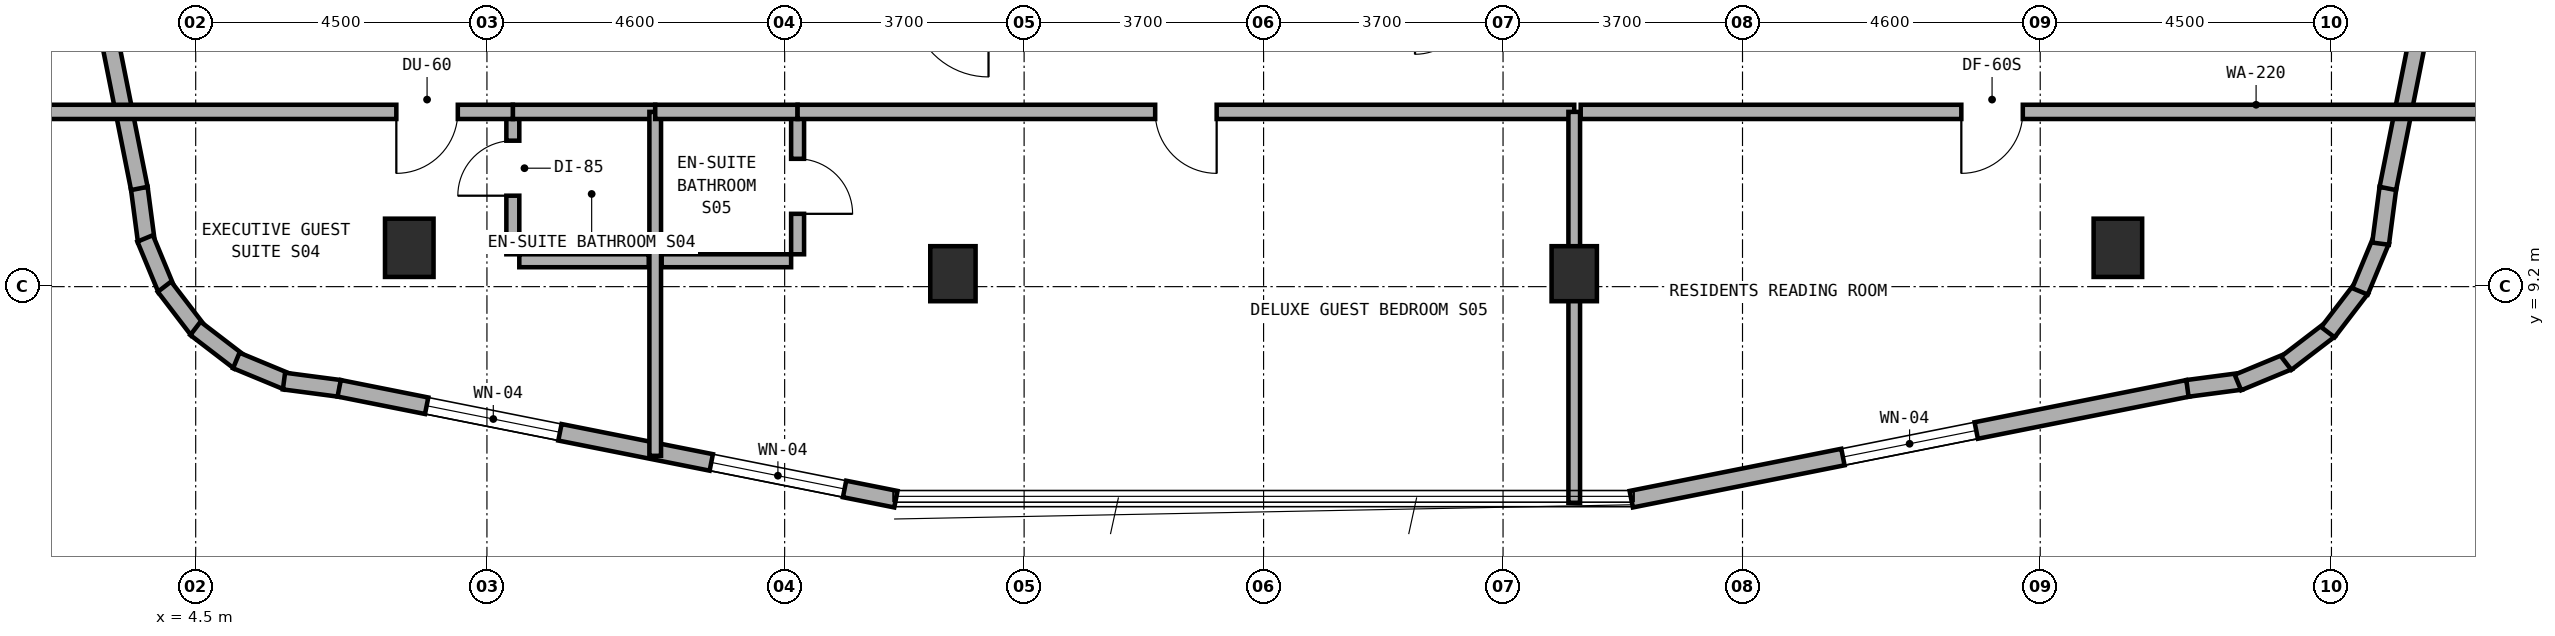
"""IFC4 building model, lengths in metres.
Left out: names, types, materials, properties, quantities, classifications, styles, units other than length and angle.
Written with IfcOpenShell. Run it as: python <this file> out.ifc"""

import sys

from ifc_helpers import new_model, si_unit, direction, frame, frame_2d, origin, origin_2d, place, context, subcontext, project, spatial, rectangle, extrude, element, fill, save


model = new_model("IFC4")
c1 = context("Model", 3, precision=1e-05, world=origin(), true_north=direction((0.0, 1.0)))
c2 = subcontext(c1, "Body", "Model", "MODEL_VIEW")
j1 = project(units=[si_unit("LENGTHUNIT", "METRE"), si_unit("PLANEANGLEUNIT", "RADIAN")], contexts=[c1])
p1 = place(None, origin())
s1 = spatial("IfcSite", under=j1, at=p1, CompositionType="ELEMENT")
p2 = place(p1, origin())
s2 = spatial("IfcBuilding", under=s1, at=p2, CompositionType="ELEMENT")
p3 = place(p2, frame((0.0, 0.0, 235.1)))
s3 = spatial("IfcBuildingStorey", under=s2, at=p3, CompositionType="ELEMENT", Elevation=235.1)
for number, where, z_axis, x_axis in (
    (1, (16.2, 9.4, 0.0), (0.0, 0.0, 1.0), (1.0, 0.0, 0.0)),
    (2, (25.8, 9.4, 0.0), (0.0, 0.0, 1.0), (1.0, 0.0, 0.0)),
):
    element("IfcColumn", number, at=place(p3, frame(where, z_axis=z_axis, x_axis=x_axis)), inside=s3, PredefinedType="COLUMN", context=c2, shape_type="SweptSolid", body=[
        extrude(rectangle(XDim=0.7, YDim=0.85, at=origin_2d()), origin(), (0.0, 0.0, 1.0), 3.6),
    ])
for number, where, z_axis, x_axis in (
    (3, (7.8, 9.8, 0.0), (0.0, 0.0, 1.0), (1.0, 0.0, 0.0)),
    (4, (34.2, 9.8, 0.0), (0.0, 0.0, 1.0), (1.0, 0.0, 0.0)),
):
    element("IfcColumn", number, at=place(p3, frame(where, z_axis=z_axis, x_axis=x_axis)), inside=s3, PredefinedType="COLUMN", context=c2, shape_type="SweptSolid", body=[
        extrude(rectangle(XDim=0.75, YDim=0.9, at=origin_2d()), origin(), (0.0, 0.0, 1.0), 3.6),
    ])
p4 = place(p3, frame((3.628, 10.725, 0.0), z_axis=(0.0, 0.0, 1.0), x_axis=(0.130954667764, -0.9913883573, 0.0)))
e5 = element("IfcWall", 5, at=p4, inside=s3, PredefinedType="STANDARD", context=c2, shape_type="SweptSolid", body=[
    extrude(rectangle(XDim=0.833, YDim=0.26, at=frame_2d((0.417, 0.0))), origin(), (0.0, 0.0, 1.0), 3.28),
])
p5 = place(p3, frame((3.719, 9.945, 0.0), z_axis=(0.0, 0.0, 1.0), x_axis=(0.382985169477, -0.923754491172, 0.0)))
e6 = element("IfcWall", 6, at=p5, inside=s3, PredefinedType="STANDARD", context=c2, shape_type="SweptSolid", body=[
    extrude(rectangle(XDim=0.851, YDim=0.26, at=frame_2d((0.426, 0.0))), origin(), (0.0, 0.0, 1.0), 3.28),
])
for number, where, z_axis, x_axis in (
    (7, (4.017, 9.199, 0.0), (0.0, 0.0, 1.0), (0.608, -0.794, 0.0)),
    (8, (4.496, 8.555, 0.0), (0.0, 0.0, 1.0), (0.794, -0.608, 0.0)),
):
    element("IfcWall", number, at=place(p3, frame(where, z_axis=z_axis, x_axis=x_axis)), inside=s3, PredefinedType="STANDARD", context=c2, shape_type="SweptSolid", body=[
        extrude(rectangle(XDim=0.85, YDim=0.26, at=frame_2d((0.425, 0.0))), origin(), (0.0, 0.0, 1.0), 3.28),
    ])
p6 = place(p3, frame((5.127, 8.059, 0.0), z_axis=(0.0, 0.0, 1.0), x_axis=(0.923652976167, -0.383229930484, 0.0)))
e9 = element("IfcWall", 9, at=p6, inside=s3, PredefinedType="STANDARD", context=c2, shape_type="SweptSolid", body=[
    extrude(rectangle(XDim=0.851, YDim=0.26, at=frame_2d((0.426, 0.0))), origin(), (0.0, 0.0, 1.0), 3.28),
])
p7 = place(p3, frame((5.864, 7.741, 0.0), z_axis=(0.0, 0.0, 1.0), x_axis=(0.991493480548, -0.130156359936, 0.0)))
e10 = element("IfcWall", 10, at=p7, inside=s3, PredefinedType="STANDARD", context=c2, shape_type="SweptSolid", body=[
    extrude(rectangle(XDim=0.868, YDim=0.26, at=frame_2d((0.434, 0.0))), origin(), (0.0, 0.0, 1.0), 3.28),
])
p8 = place(p3, frame((6.717, 7.629, 0.0), z_axis=(0.0, 0.0, 1.0), x_axis=(0.980745199176, -0.195291715883, 0.0)))
e11 = element("IfcWall", 11, at=p8, inside=s3, PredefinedType="STANDARD", context=c2, shape_type="SweptSolid", body=[
    extrude(rectangle(XDim=8.771, YDim=0.26, at=frame_2d((4.385, 0.0))), origin(), (0.0, 0.0, 1.0), 3.28),
])
p9 = place(p8, frame((1.378, 0.0, 0.85)))
e12 = element("IfcOpeningElement", 12, at=p9, cuts=e11, PredefinedType="OPENING", context=c2, shape_type="SweptSolid", body=[
    extrude(rectangle(XDim=2.1, YDim=1.5, at=frame_2d((1.05, 0.75))), frame((0.0, 0.14, 0.0), z_axis=(0.0, -1.0, 0.0), x_axis=(1.0, 0.0, 0.0)), (0.0, 0.0, 1.0), 0.28),
])
p10 = place(p8, frame((5.862, 0.0, 0.85)))
e13 = element("IfcOpeningElement", 13, at=p10, cuts=e11, PredefinedType="OPENING", context=c2, shape_type="SweptSolid", body=[
    extrude(rectangle(XDim=2.1, YDim=1.5, at=frame_2d((1.05, 0.75))), frame((0.0, 0.14, 0.0), z_axis=(0.0, -1.0, 0.0), x_axis=(1.0, 0.0, 0.0)), (0.0, 0.0, 1.0), 0.28),
])
p11 = place(p3, frame((26.681, 5.916, 0.0), z_axis=(0.0, 0.0, 1.0), x_axis=(0.980745199176, 0.195291715883, 0.0)))
e14 = element("IfcWall", 14, at=p11, inside=s3, PredefinedType="STANDARD", context=c2, shape_type="SweptSolid", body=[
    extrude(rectangle(XDim=8.771, YDim=0.26, at=frame_2d((4.385, 0.0))), origin(), (0.0, 0.0, 1.0), 3.28),
])
p12 = place(p11, frame((3.335, 0.0, 0.85)))
e15 = element("IfcOpeningElement", 15, at=p12, cuts=e14, PredefinedType="OPENING", context=c2, shape_type="SweptSolid", body=[
    extrude(rectangle(XDim=2.1, YDim=1.5, at=frame_2d((1.05, 0.75))), frame((0.0, 0.14, 0.0), z_axis=(0.0, -1.0, 0.0), x_axis=(1.0, 0.0, 0.0)), (0.0, 0.0, 1.0), 0.28),
])
p13 = place(p3, frame((35.275, 7.628, 0.0), z_axis=(0.0, 0.0, 1.0), x_axis=(0.9913883573, 0.130954667764, 0.0)))
e16 = element("IfcWall", 16, at=p13, inside=s3, PredefinedType="STANDARD", context=c2, shape_type="SweptSolid", body=[
    extrude(rectangle(XDim=0.833, YDim=0.26, at=frame_2d((0.417, 0.0))), origin(), (0.0, 0.0, 1.0), 3.28),
])
p14 = place(p3, frame((36.055, 7.719, 0.0), z_axis=(0.0, 0.0, 1.0), x_axis=(0.923754491172, 0.382985169477, 0.0)))
e17 = element("IfcWall", 17, at=p14, inside=s3, PredefinedType="STANDARD", context=c2, shape_type="SweptSolid", body=[
    extrude(rectangle(XDim=0.851, YDim=0.26, at=frame_2d((0.426, 0.0))), origin(), (0.0, 0.0, 1.0), 3.28),
])
for number, where, z_axis, x_axis in (
    (18, (36.801, 8.017, 0.0), (0.0, 0.0, 1.0), (0.794, 0.608, 0.0)),
    (19, (37.445, 8.496, 0.0), (0.0, 0.0, 1.0), (0.608, 0.794, 0.0)),
):
    element("IfcWall", number, at=place(p3, frame(where, z_axis=z_axis, x_axis=x_axis)), inside=s3, PredefinedType="STANDARD", context=c2, shape_type="SweptSolid", body=[
        extrude(rectangle(XDim=0.85, YDim=0.26, at=frame_2d((0.425, 0.0))), origin(), (0.0, 0.0, 1.0), 3.28),
    ])
p15 = place(p3, frame((37.941, 9.127, 0.0), z_axis=(0.0, 0.0, 1.0), x_axis=(0.383229930484, 0.923652976167, 0.0)))
e20 = element("IfcWall", 20, at=p15, inside=s3, PredefinedType="STANDARD", context=c2, shape_type="SweptSolid", body=[
    extrude(rectangle(XDim=0.851, YDim=0.26, at=frame_2d((0.426, 0.0))), origin(), (0.0, 0.0, 1.0), 3.28),
])
p16 = place(p3, frame((38.259, 9.864, 0.0), z_axis=(0.0, 0.0, 1.0), x_axis=(0.130156359936, 0.991493480548, 0.0)))
e21 = element("IfcWall", 21, at=p16, inside=s3, PredefinedType="STANDARD", context=c2, shape_type="SweptSolid", body=[
    extrude(rectangle(XDim=0.868, YDim=0.26, at=frame_2d((0.434, 0.0))), origin(), (0.0, 0.0, 1.0), 3.28),
])
p17 = place(p3, frame((38.371, 10.717, 0.0), z_axis=(0.0, 0.0, 1.0), x_axis=(0.195291715883, 0.980745199176, 0.0)))
e22 = element("IfcWall", 22, at=p17, inside=s3, PredefinedType="STANDARD", context=c2, shape_type="SweptSolid", body=[
    extrude(rectangle(XDim=8.771, YDim=0.26, at=frame_2d((4.385, 0.0))), origin(), (0.0, 0.0, 1.0), 3.28),
])
p18 = place(p17, frame((4.0, 0.0, 0.85)))
e23 = element("IfcOpeningElement", 23, at=p18, cuts=e22, PredefinedType="OPENING", context=c2, shape_type="SweptSolid", body=[
    extrude(rectangle(XDim=2.1, YDim=1.5, at=frame_2d((1.05, 0.75))), frame((0.0, 0.14, 0.0), z_axis=(0.0, -1.0, 0.0), x_axis=(1.0, 0.0, 0.0)), (0.0, 0.0, 1.0), 0.28),
])
p19 = place(p3, frame((1.916, 19.319, 0.0), z_axis=(0.0, 0.0, 1.0), x_axis=(0.195291715883, -0.980745199176, 0.0)))
e24 = element("IfcWall", 24, at=p19, inside=s3, PredefinedType="STANDARD", context=c2, shape_type="SweptSolid", body=[
    extrude(rectangle(XDim=8.771, YDim=0.26, at=frame_2d((4.385, 0.0))), origin(), (0.0, 0.0, 1.0), 3.28),
])
p20 = place(p19, frame((2.67, 0.0, 0.85)))
e25 = element("IfcOpeningElement", 25, at=p20, cuts=e24, PredefinedType="OPENING", context=c2, shape_type="SweptSolid", body=[
    extrude(rectangle(XDim=2.1, YDim=1.5, at=frame_2d((1.05, 0.75))), frame((0.0, 0.14, 0.0), z_axis=(0.0, -1.0, 0.0), x_axis=(1.0, 0.0, 0.0)), (0.0, 0.0, 1.0), 0.28),
])
p21 = place(p3, frame((9.4, 9.7, 0.0), z_axis=(0.0, 0.0, 1.0), x_axis=(0.0, 1.0, 0.0)))
e26 = element("IfcWall", 26, at=p21, inside=s3, PredefinedType="PLUMBINGWALL", context=c2, shape_type="SweptSolid", body=[
    extrude(rectangle(XDim=2.1, YDim=0.2, at=frame_2d((1.05, 0.0))), origin(), (0.0, 0.0, 1.0), 2.895),
])
p22 = place(p21, frame((0.905, 0.0, 0.0)))
e27 = element("IfcOpeningElement", 27, at=p22, cuts=e26, PredefinedType="OPENING", context=c2, shape_type="SweptSolid", body=[
    extrude(rectangle(XDim=0.85, YDim=2.1, at=frame_2d((0.425, 1.05))), frame((0.0, 0.11, 0.0), z_axis=(0.0, -1.0, 0.0), x_axis=(1.0, 0.0, 0.0)), (0.0, 0.0, 1.0), 0.22),
])
p23 = place(p3, frame((9.5, 9.6, 0.0), z_axis=(0.0, 0.0, 1.0), x_axis=(1.0, 0.0, 0.0)))
e28 = element("IfcWall", 28, at=p23, inside=s3, PredefinedType="PLUMBINGWALL", context=c2, shape_type="SweptSolid", body=[
    extrude(rectangle(XDim=2.0, YDim=0.2, at=frame_2d((1.0, 0.0))), origin(), (0.0, 0.0, 1.0), 2.975),
])
p24 = place(p3, frame((9.4, 11.9, 0.0), z_axis=(0.0, 0.0, 1.0), x_axis=(1.0, 0.0, 0.0)))
e29 = element("IfcWall", 29, at=p24, inside=s3, PredefinedType="SOLIDWALL", context=c2, shape_type="SweptSolid", body=[
    extrude(rectangle(XDim=2.2, YDim=0.22, at=frame_2d((1.1, 0.0))), origin(), (0.0, 0.0, 1.0), 3.28),
])
p25 = place(p3, frame((1.96, 11.9, 0.0), z_axis=(0.0, 0.0, 1.0), x_axis=(1.0, 0.0, 0.0)))
e30 = element("IfcWall", 30, at=p25, inside=s3, PredefinedType="SOLIDWALL", context=c2, shape_type="SweptSolid", body=[
    extrude(rectangle(XDim=7.44, YDim=0.22, at=frame_2d((3.72, 0.0))), origin(), (0.0, 0.0, 1.0), 2.705),
])
p26 = place(p25, frame((5.64, 0.0, 0.0)))
e31 = element("IfcOpeningElement", 31, at=p26, cuts=e30, PredefinedType="OPENING", context=c2, shape_type="SweptSolid", body=[
    extrude(rectangle(XDim=0.95, YDim=2.1, at=frame_2d((0.475, 1.05))), frame((0.0, 0.12, 0.0), z_axis=(0.0, -1.0, 0.0), x_axis=(1.0, 0.0, 0.0)), (0.0, 0.0, 1.0), 0.24),
])
p27 = place(p3, frame((11.6, 6.586, 0.0), z_axis=(0.0, 0.0, 1.0), x_axis=(0.0, 1.0, 0.0)))
e32 = element("IfcWall", 32, at=p27, inside=s3, PredefinedType="SOLIDWALL", context=c2, shape_type="SweptSolid", body=[
    extrude(rectangle(XDim=5.314, YDim=0.18, at=frame_2d((2.657, 0.0))), origin(), (0.0, 0.0, 1.0), 2.895),
])
p28 = place(p3, frame((13.8, 9.7, 0.0), z_axis=(0.0, 0.0, 1.0), x_axis=(0.0, 1.0, 0.0)))
e33 = element("IfcWall", 33, at=p28, inside=s3, PredefinedType="PLUMBINGWALL", context=c2, shape_type="SweptSolid", body=[
    extrude(rectangle(XDim=2.1, YDim=0.2, at=frame_2d((1.05, 0.0))), origin(), (0.0, 0.0, 1.0), 2.895),
])
p29 = place(p28, frame((0.625, 0.0, 0.0)))
e34 = element("IfcOpeningElement", 34, at=p29, cuts=e33, PredefinedType="OPENING", context=c2, shape_type="SweptSolid", body=[
    extrude(rectangle(XDim=0.85, YDim=2.1, at=frame_2d((0.425, 1.05))), frame((0.0, 0.11, 0.0), z_axis=(0.0, -1.0, 0.0), x_axis=(1.0, 0.0, 0.0)), (0.0, 0.0, 1.0), 0.22),
])
p30 = place(p3, frame((11.7, 9.6, 0.0), z_axis=(0.0, 0.0, 1.0), x_axis=(1.0, 0.0, 0.0)))
e35 = element("IfcWall", 35, at=p30, inside=s3, PredefinedType="PLUMBINGWALL", context=c2, shape_type="SweptSolid", body=[
    extrude(rectangle(XDim=2.0, YDim=0.2, at=frame_2d((1.0, 0.0))), origin(), (0.0, 0.0, 1.0), 2.975),
])
p31 = place(p3, frame((11.6, 11.9, 0.0), z_axis=(0.0, 0.0, 1.0), x_axis=(1.0, 0.0, 0.0)))
e36 = element("IfcWall", 36, at=p31, inside=s3, PredefinedType="SOLIDWALL", context=c2, shape_type="SweptSolid", body=[
    extrude(rectangle(XDim=2.2, YDim=0.22, at=frame_2d((1.1, 0.0))), origin(), (0.0, 0.0, 1.0), 3.28),
])
p32 = place(p3, frame((13.8, 11.9, 0.0), z_axis=(0.0, 0.0, 1.0), x_axis=(1.0, 0.0, 0.0)))
e37 = element("IfcWall", 37, at=p32, inside=s3, PredefinedType="SOLIDWALL", context=c2, shape_type="SweptSolid", body=[
    extrude(rectangle(XDim=12.0, YDim=0.22, at=frame_2d((6.0, 0.0))), origin(), (0.0, 0.0, 1.0), 2.705),
])
p33 = place(p32, frame((5.525, 0.0, 0.0)))
e38 = element("IfcOpeningElement", 38, at=p33, cuts=e37, PredefinedType="OPENING", context=c2, shape_type="SweptSolid", body=[
    extrude(rectangle(XDim=0.95, YDim=2.1, at=frame_2d((0.475, 1.05))), frame((0.0, 0.12, 0.0), z_axis=(0.0, -1.0, 0.0), x_axis=(1.0, 0.0, 0.0)), (0.0, 0.0, 1.0), 0.24),
])
p34 = place(p3, frame((25.8, 5.86, 0.0), z_axis=(0.0, 0.0, 1.0), x_axis=(0.0, 1.0, 0.0)))
e39 = element("IfcWall", 39, at=p34, inside=s3, PredefinedType="SOLIDWALL", context=c2, shape_type="SweptSolid", body=[
    extrude(rectangle(XDim=6.04, YDim=0.18, at=frame_2d((3.02, 0.0))), origin(), (0.0, 0.0, 1.0), 2.705),
])
p35 = place(p3, frame((25.9, 11.9, 0.0), z_axis=(0.0, 0.0, 1.0), x_axis=(1.0, 0.0, 0.0)))
e40 = element("IfcWall", 40, at=p35, inside=s3, PredefinedType="SOLIDWALL", context=c2, shape_type="SweptSolid", body=[
    extrude(rectangle(XDim=14.04, YDim=0.22, at=frame_2d((7.02, 0.0))), origin(), (0.0, 0.0, 1.0), 2.705),
])
p36 = place(p35, frame((5.881, 0.0, 0.0)))
e41 = element("IfcOpeningElement", 41, at=p36, cuts=e40, PredefinedType="OPENING", context=c2, shape_type="SweptSolid", body=[
    extrude(rectangle(XDim=0.95, YDim=2.1, at=frame_2d((0.475, 1.05))), frame((0.0, 0.12, 0.0), z_axis=(0.0, -1.0, 0.0), x_axis=(1.0, 0.0, 0.0)), (0.0, 0.0, 1.0), 0.24),
])
p37 = place(p9, origin())
e42 = element("IfcWindow", 42, at=p37, inside=s3, PartitioningType="SINGLE_PANEL", PredefinedType="WINDOW", context=c2, shape_type="SweptSolid", body=[
    extrude(rectangle(XDim=2.1, YDim=1.5, at=frame_2d((1.05, 0.75))), frame((0.0, 0.03, 0.0), z_axis=(0.0, -1.0, 0.0), x_axis=(1.0, 0.0, 0.0)), (0.0, 0.0, 1.0), 0.06),
])
fill(e12, e42)
p38 = place(p10, origin())
e43 = element("IfcWindow", 43, at=p38, inside=s3, PartitioningType="SINGLE_PANEL", PredefinedType="WINDOW", context=c2, shape_type="SweptSolid", body=[
    extrude(rectangle(XDim=2.1, YDim=1.5, at=frame_2d((1.05, 0.75))), frame((0.0, 0.03, 0.0), z_axis=(0.0, -1.0, 0.0), x_axis=(1.0, 0.0, 0.0)), (0.0, 0.0, 1.0), 0.06),
])
fill(e13, e43)
p39 = place(p12, origin())
e44 = element("IfcWindow", 44, at=p39, inside=s3, PartitioningType="SINGLE_PANEL", PredefinedType="WINDOW", context=c2, shape_type="SweptSolid", body=[
    extrude(rectangle(XDim=2.1, YDim=1.5, at=frame_2d((1.05, 0.75))), frame((0.0, 0.03, 0.0), z_axis=(0.0, -1.0, 0.0), x_axis=(1.0, 0.0, 0.0)), (0.0, 0.0, 1.0), 0.06),
])
fill(e15, e44)
p40 = place(p22, origin())
e45 = element("IfcDoor", 45, at=p40, inside=s3, OperationType="SINGLE_SWING_LEFT", PredefinedType="DOOR", context=c2, shape_type="SweptSolid", body=[
    extrude(rectangle(XDim=0.85, YDim=2.1, at=frame_2d((0.425, 1.05))), frame((0.0, 0.025, 0.0), z_axis=(0.0, -1.0, 0.0), x_axis=(1.0, 0.0, 0.0)), (0.0, 0.0, 1.0), 0.05),
])
fill(e27, e45)
p41 = place(p26, frame((0.95, 0.0, 0.0), z_axis=(0.0, 0.0, 1.0), x_axis=(-1.0, 0.0, 0.0)))
e46 = element("IfcDoor", 46, at=p41, inside=s3, OperationType="SINGLE_SWING_RIGHT", PredefinedType="DOOR", context=c2, shape_type="SweptSolid", body=[
    extrude(rectangle(XDim=0.95, YDim=2.1, at=frame_2d((0.475, 1.05))), frame((0.0, 0.025, 0.0), z_axis=(0.0, -1.0, 0.0), x_axis=(1.0, 0.0, 0.0)), (0.0, 0.0, 1.0), 0.05),
])
fill(e31, e46)
p42 = place(p29, frame((0.85, 0.0, 0.0), z_axis=(0.0, 0.0, 1.0), x_axis=(-1.0, 0.0, 0.0)))
e47 = element("IfcDoor", 47, at=p42, inside=s3, OperationType="SINGLE_SWING_RIGHT", PredefinedType="DOOR", context=c2, shape_type="SweptSolid", body=[
    extrude(rectangle(XDim=0.85, YDim=2.1, at=frame_2d((0.425, 1.05))), frame((0.0, 0.025, 0.0), z_axis=(0.0, -1.0, 0.0), x_axis=(1.0, 0.0, 0.0)), (0.0, 0.0, 1.0), 0.05),
])
fill(e34, e47)
p43 = place(p33, frame((0.95, 0.0, 0.0), z_axis=(0.0, 0.0, 1.0), x_axis=(-1.0, 0.0, 0.0)))
e48 = element("IfcDoor", 48, at=p43, inside=s3, OperationType="SINGLE_SWING_LEFT", PredefinedType="DOOR", context=c2, shape_type="SweptSolid", body=[
    extrude(rectangle(XDim=0.95, YDim=2.1, at=frame_2d((0.475, 1.05))), frame((0.0, 0.025, 0.0), z_axis=(0.0, -1.0, 0.0), x_axis=(1.0, 0.0, 0.0)), (0.0, 0.0, 1.0), 0.05),
])
fill(e38, e48)
p44 = place(p36, frame((0.95, 0.0, 0.0), z_axis=(0.0, 0.0, 1.0), x_axis=(-1.0, 0.0, 0.0)))
e49 = element("IfcDoor", 49, at=p44, inside=s3, OperationType="SINGLE_SWING_RIGHT", PredefinedType="DOOR", context=c2, shape_type="SweptSolid", body=[
    extrude(rectangle(XDim=0.95, YDim=2.1, at=frame_2d((0.475, 1.05))), frame((0.0, 0.025, 0.0), z_axis=(0.0, -1.0, 0.0), x_axis=(1.0, 0.0, 0.0)), (0.0, 0.0, 1.0), 0.05),
])
fill(e41, e49)
save(model, sys.argv[1])
